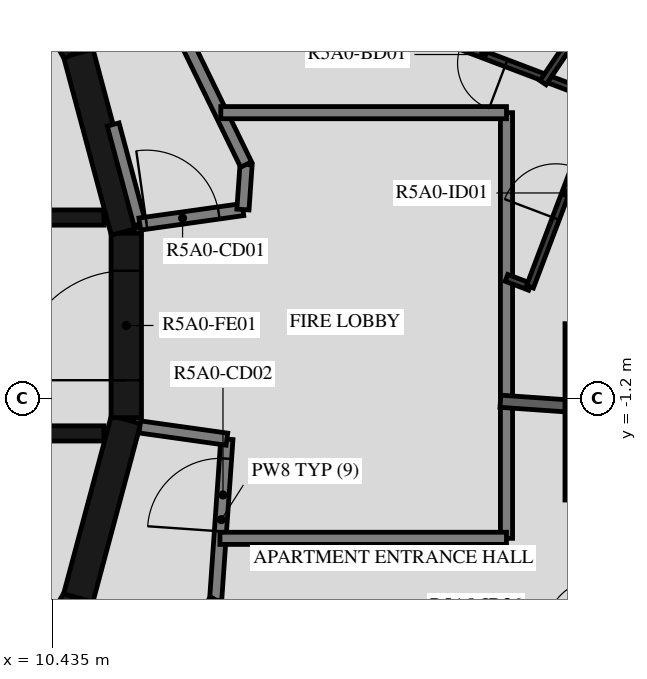
"""IFC4 building model, lengths in metres.
Left out: names, types, materials, properties, quantities, classifications, styles, units other than length and angle.
Written with IfcOpenShell. Run it as: python <this file> out.ifc"""

import sys

from ifc_helpers import new_model, si_unit, direction, frame, frame_2d, origin, place, context, subcontext, project, spatial, polyline, rectangle, outline, extrude, element, fill, save


model = new_model("IFC4")
c1 = context("Model", 3, precision=1e-05, world=origin(), true_north=direction((0.0, 1.0)))
c2 = subcontext(c1, "Body", "Model", "MODEL_VIEW")
j1 = project(units=[si_unit("LENGTHUNIT", "METRE"), si_unit("PLANEANGLEUNIT", "RADIAN")], contexts=[c1])
p1 = place(None, origin())
s1 = spatial("IfcSite", under=j1, at=p1, CompositionType="ELEMENT")
p2 = place(p1, origin())
s2 = spatial("IfcBuilding", under=s1, at=p2, CompositionType="ELEMENT")
p3 = place(p2, frame((0.0, 0.0, 188.4)))
s3 = spatial("IfcBuildingStorey", under=s2, at=p3, CompositionType="ELEMENT", Elevation=188.4)
p4 = place(p3, frame((-0.808, 27.101, 0.03), z_axis=(0.0, 0.0, 1.0), x_axis=(0.76040780846, -0.649445890613, 0.0)))
e1 = element("IfcWall", 1, at=p4, inside=s3, PredefinedType="PARAPET", context=c2, shape_type="SweptSolid", body=[
    extrude(rectangle(XDim=36.429, YDim=0.2, at=frame_2d((18.214, 0.0))), origin(), (0.0, 0.0, 1.0), 1.5),
])
for number, where, z_axis, x_axis in (
    (2, (9.329, -7.137, 0.0), (0.0, 0.0, 1.0), (0.5, 0.866, 0.0)),
    (3, (10.858, -4.479, 0.0), (0.0, 0.0, 1.0), (0.259, 0.966, 0.0)),
):
    element("IfcWall", number, at=place(p3, frame(where, z_axis=z_axis, x_axis=x_axis)), inside=s3, PredefinedType="SHEAR", context=c2, shape_type="SweptSolid", body=[
        extrude(rectangle(XDim=3.033, YDim=0.5, at=frame_2d((1.516, 0.0))), origin(), (0.0, 0.0, 1.0), 3.12),
    ])
p5 = place(p3, frame((11.647, -1.516, 0.0), z_axis=(0.0, 0.0, 1.0), x_axis=(0.0, 1.0, 0.0)))
e4 = element("IfcWall", 4, at=p5, inside=s3, PredefinedType="SHEAR", context=c2, shape_type="SweptSolid", body=[
    extrude(rectangle(XDim=3.033, YDim=0.5, at=frame_2d((1.516, 0.0))), origin(), (0.0, 0.0, 1.0), 3.12),
])
p6 = place(p5, frame((0.616, 0.0, 0.0)))
e5 = element("IfcOpeningElement", 5, at=p6, cuts=e4, PredefinedType="OPENING", context=c2, shape_type="SweptSolid", body=[
    extrude(rectangle(XDim=1.8, YDim=2.1, at=frame_2d((0.9, 1.05))), frame((0.0, 0.26, 0.0), z_axis=(0.0, -1.0, 0.0), x_axis=(1.0, 0.0, 0.0)), (0.0, 0.0, 1.0), 0.52),
])
for number, where, z_axis, x_axis in (
    (6, (11.643, 1.55, 0.0), (0.0, 0.0, 1.0), (-0.259, 0.966, 0.0)),
    (7, (10.845, 4.51, 0.0), (0.0, 0.0, 1.0), (-0.5, 0.866, 0.0)),
):
    element("IfcWall", number, at=place(p3, frame(where, z_axis=z_axis, x_axis=x_axis)), inside=s3, PredefinedType="SHEAR", context=c2, shape_type="SweptSolid", body=[
        extrude(rectangle(XDim=3.033, YDim=0.5, at=frame_2d((1.516, 0.0))), origin(), (0.0, 0.0, 1.0), 3.12),
    ])
p7 = place(p3, frame((3.35, 1.775, 0.0), z_axis=(0.0, 0.0, 1.0), x_axis=(1.0, 0.0, 0.0)))
e8 = element("IfcWall", 8, at=p7, inside=s3, PredefinedType="SHEAR", context=c2, shape_type="SweptSolid", body=[
    extrude(rectangle(XDim=7.93, YDim=0.25, at=frame_2d((3.965, 0.0))), origin(), (0.0, 0.0, 1.0), 3.12),
])
p8 = place(p7, frame((0.35, 0.0, 0.0)))
e9 = element("IfcOpeningElement", 9, at=p8, cuts=e8, PredefinedType="OPENING", context=c2, shape_type="SweptSolid", body=[
    extrude(rectangle(XDim=1.2, YDim=2.4, at=frame_2d((0.6, 1.2))), frame((0.0, 0.135, 0.0), z_axis=(0.0, -1.0, 0.0), x_axis=(1.0, 0.0, 0.0)), (0.0, 0.0, 1.0), 0.27),
])
p9 = place(p7, frame((2.5, 0.0, 0.0)))
e10 = element("IfcOpeningElement", 10, at=p9, cuts=e8, PredefinedType="OPENING", context=c2, shape_type="SweptSolid", body=[
    extrude(rectangle(XDim=1.2, YDim=2.4, at=frame_2d((0.6, 1.2))), frame((0.0, 0.135, 0.0), z_axis=(0.0, -1.0, 0.0), x_axis=(1.0, 0.0, 0.0)), (0.0, 0.0, 1.0), 0.27),
])
p10 = place(p7, frame((4.8, 0.0, 0.0)))
e11 = element("IfcOpeningElement", 11, at=p10, cuts=e8, PredefinedType="OPENING", context=c2, shape_type="SweptSolid", body=[
    extrude(rectangle(XDim=0.9, YDim=2.1, at=frame_2d((0.45, 1.05))), frame((0.0, 0.135, 0.0), z_axis=(0.0, -1.0, 0.0), x_axis=(1.0, 0.0, 0.0)), (0.0, 0.0, 1.0), 0.27),
])
p11 = place(p3, frame((3.35, -1.775, 0.0), z_axis=(0.0, 0.0, 1.0), x_axis=(1.0, 0.0, 0.0)))
e12 = element("IfcWall", 12, at=p11, inside=s3, PredefinedType="SHEAR", context=c2, shape_type="SweptSolid", body=[
    extrude(rectangle(XDim=7.93, YDim=0.25, at=frame_2d((3.965, 0.0))), origin(), (0.0, 0.0, 1.0), 3.12),
])
p12 = place(p11, frame((0.4, 0.0, 0.0)))
e13 = element("IfcOpeningElement", 13, at=p12, cuts=e12, PredefinedType="OPENING", context=c2, shape_type="SweptSolid", body=[
    extrude(rectangle(XDim=1.1, YDim=2.4, at=frame_2d((0.55, 1.2))), frame((0.0, 0.135, 0.0), z_axis=(0.0, -1.0, 0.0), x_axis=(1.0, 0.0, 0.0)), (0.0, 0.0, 1.0), 0.27),
])
p13 = place(p11, frame((2.55, 0.0, 0.0)))
e14 = element("IfcOpeningElement", 14, at=p13, cuts=e12, PredefinedType="OPENING", context=c2, shape_type="SweptSolid", body=[
    extrude(rectangle(XDim=1.1, YDim=2.4, at=frame_2d((0.55, 1.2))), frame((0.0, 0.135, 0.0), z_axis=(0.0, -1.0, 0.0), x_axis=(1.0, 0.0, 0.0)), (0.0, 0.0, 1.0), 0.27),
])
p14 = place(p11, frame((4.7, 0.0, 0.0)))
e15 = element("IfcOpeningElement", 15, at=p14, cuts=e12, PredefinedType="OPENING", context=c2, shape_type="SweptSolid", body=[
    extrude(rectangle(XDim=1.1, YDim=2.4, at=frame_2d((0.55, 1.2))), frame((0.0, 0.135, 0.0), z_axis=(0.0, -1.0, 0.0), x_axis=(1.0, 0.0, 0.0)), (0.0, 0.0, 1.0), 0.27),
])
p15 = place(p3, frame((11.87, 1.668, 0.0), z_axis=(0.0, 0.0, 1.0), x_axis=(-0.258836880648, 0.965921047093, 0.0)))
e16 = element("IfcWall", 16, at=p15, inside=s3, PredefinedType="STANDARD", context=c2, shape_type="SweptSolid", body=[
    extrude(rectangle(XDim=1.695, YDim=0.2, at=frame_2d((0.848, 0.0))), origin(), (0.0, 0.0, 1.0), 3.12),
])
p16 = place(p3, frame((11.87, 1.668, 0.0), z_axis=(0.0, 0.0, 1.0), x_axis=(0.990271931984, 0.139145609792, 0.0)))
e17 = element("IfcWall", 17, at=p16, inside=s3, PredefinedType="STANDARD", context=c2, shape_type="SweptSolid", body=[
    extrude(rectangle(XDim=1.712, YDim=0.2, at=frame_2d((0.856, 0.0))), origin(), (0.0, 0.0, 1.0), 3.12),
])
p17 = place(p16, frame((0.11, 0.0, 0.0)))
e18 = element("IfcOpeningElement", 18, at=p17, cuts=e17, PredefinedType="OPENING", context=c2, shape_type="SweptSolid", body=[
    extrude(rectangle(XDim=1.2, YDim=2.1, at=frame_2d((0.6, 1.05))), frame((0.0, 0.11, 0.0), z_axis=(0.0, -1.0, 0.0), x_axis=(1.0, 0.0, 0.0)), (0.0, 0.0, 1.0), 0.22),
])
p18 = place(p3, frame((13.566, 1.906, 0.0), z_axis=(0.0, 0.0, 1.0), x_axis=(0.07005495793, 0.997543133338, 0.0)))
e19 = element("IfcWall", 19, at=p18, inside=s3, PredefinedType="STANDARD", context=c2, shape_type="SweptSolid", body=[
    extrude(rectangle(XDim=0.742, YDim=0.2, at=frame_2d((0.371, 0.0))), origin(), (0.0, 0.0, 1.0), 3.12),
])
p19 = place(p3, frame((13.618, 2.647, 0.0), z_axis=(0.0, 0.0, 1.0), x_axis=(-0.438366026218, 0.898796543751, 0.0)))
e20 = element("IfcWall", 20, at=p19, inside=s3, PredefinedType="STANDARD", context=c2, shape_type="SweptSolid", body=[
    extrude(rectangle(XDim=7.181, YDim=0.2, at=frame_2d((3.591, 0.0))), origin(), (0.0, 0.0, 1.0), 3.12),
])
p20 = place(p3, frame((13.117, -4.517, 0.0), z_axis=(0.0, 0.0, 1.0), x_axis=(0.069736659613, 0.997565435601, 0.0)))
e21 = element("IfcWall", 21, at=p20, inside=s3, PredefinedType="STANDARD", context=c2, shape_type="SweptSolid", body=[
    extrude(rectangle(XDim=2.654, YDim=0.2, at=frame_2d((1.327, 0.0))), origin(), (0.0, 0.0, 1.0), 3.12),
])
p21 = place(p20, frame((1.134, 0.0, 0.0)))
e22 = element("IfcOpeningElement", 22, at=p21, cuts=e21, PredefinedType="OPENING", context=c2, shape_type="SweptSolid", body=[
    extrude(rectangle(XDim=1.2, YDim=2.1, at=frame_2d((0.6, 1.05))), frame((0.0, 0.11, 0.0), z_axis=(0.0, -1.0, 0.0), x_axis=(1.0, 0.0, 0.0)), (0.0, 0.0, 1.0), 0.22),
])
p22 = place(p3, frame((13.302, -1.869, 0.0), z_axis=(0.0, 0.0, 1.0), x_axis=(-0.990274397042, 0.13912806533, 0.0)))
e23 = element("IfcWall", 23, at=p22, inside=s3, PredefinedType="STANDARD", context=c2, shape_type="SweptSolid", body=[
    extrude(rectangle(XDim=1.446, YDim=0.2, at=frame_2d((0.723, 0.0))), origin(), (0.0, 0.0, 1.0), 3.12),
])
p23 = place(p3, frame((9.101, -10.47, 0.0), z_axis=(0.0, 0.0, 1.0), x_axis=(0.559195469534, 0.829035841718, 0.0)))
e24 = element("IfcWall", 24, at=p23, inside=s3, PredefinedType="STANDARD", context=c2, shape_type="SweptSolid", body=[
    extrude(rectangle(XDim=7.181, YDim=0.2, at=frame_2d((3.591, 0.0))), origin(), (0.0, 0.0, 1.0), 3.12),
])
p24 = place(p3, frame((17.9, -3.5, 0.0), z_axis=(0.0, 0.0, 1.0), x_axis=(0.0, 1.0, 0.0)))
e25 = element("IfcWall", 25, at=p24, inside=s3, PredefinedType="STANDARD", context=c2, shape_type="SweptSolid", body=[
    extrude(rectangle(XDim=7.0, YDim=0.2, at=frame_2d((3.5, 0.0))), origin(), (0.0, 0.0, 1.0), 3.12),
])
p25 = place(p3, frame((17.9, 3.5, 0.0), z_axis=(0.0, 0.0, 1.0), x_axis=(-1.0, 0.0, 0.0)))
e26 = element("IfcWall", 26, at=p25, inside=s3, PredefinedType="STANDARD", context=c2, shape_type="SweptSolid", body=[
    extrude(rectangle(XDim=4.698, YDim=0.2, at=frame_2d((2.349, 0.0))), origin(), (0.0, 0.0, 1.0), 3.12),
])
p26 = place(p3, frame((13.188, -3.5, 0.0), z_axis=(0.0, 0.0, 1.0), x_axis=(1.0, 0.0, 0.0)))
e27 = element("IfcWall", 27, at=p26, inside=s3, PredefinedType="STANDARD", context=c2, shape_type="SweptSolid", body=[
    extrude(rectangle(XDim=4.712, YDim=0.2, at=frame_2d((2.356, 0.0))), origin(), (0.0, 0.0, 1.0), 3.12),
])
p27 = place(p3, frame((17.8, -1.246, 0.0), z_axis=(0.0, 0.0, 1.0), x_axis=(0.997562681713, -0.069776042122, 0.0)))
e28 = element("IfcWall", 28, at=p27, inside=s3, PredefinedType="STANDARD", context=c2, shape_type="SweptSolid", body=[
    extrude(rectangle(XDim=1.144, YDim=0.2, at=frame_2d((0.572, 0.0))), origin(), (0.0, 0.0, 1.0), 3.12),
])
p28 = place(p3, frame((17.9, 0.783, 0.0), z_axis=(0.0, 0.0, 1.0), x_axis=(0.93513272442, -0.354297597677, 0.0)))
e29 = element("IfcWall", 29, at=p28, inside=s3, PredefinedType="PARTITIONING", context=c2, shape_type="SweptSolid", body=[
    extrude(rectangle(XDim=0.413, YDim=0.12, at=frame_2d((0.207, 0.0))), origin(), (0.0, 0.0, 1.0), 3.12),
])
p29 = place(p3, frame((18.286, 0.637, 0.0), z_axis=(0.0, 0.0, 1.0), x_axis=(0.354672075988, 0.934990758518, 0.0)))
e30 = element("IfcWall", 30, at=p29, inside=s3, PredefinedType="PARTITIONING", context=c2, shape_type="SweptSolid", body=[
    extrude(rectangle(XDim=3.3, YDim=0.12, at=frame_2d((1.65, 0.0))), origin(), (0.0, 0.0, 1.0), 3.12),
])
p30 = place(p29, frame((1.2, 0.0, 0.0)))
e31 = element("IfcOpeningElement", 31, at=p30, cuts=e30, PredefinedType="OPENING", context=c2, shape_type="SweptSolid", body=[
    extrude(rectangle(XDim=0.9, YDim=2.1, at=frame_2d((0.45, 1.05))), frame((0.0, 0.07, 0.0), z_axis=(0.0, -1.0, 0.0), x_axis=(1.0, 0.0, 0.0)), (0.0, 0.0, 1.0), 0.14),
])
p31 = place(p3, frame((19.456, 3.722, 0.0), z_axis=(0.0, 0.0, 1.0), x_axis=(-0.935017484321, 0.3546016131, 0.0)))
e32 = element("IfcWall", 32, at=p31, inside=s3, PredefinedType="PARTITIONING", context=c2, shape_type="SweptSolid", body=[
    extrude(rectangle(XDim=5.734, YDim=0.12, at=frame_2d((2.867, 0.0))), origin(), (0.0, 0.0, 1.0), 3.12),
])
p32 = place(p31, frame((1.669, 0.0, 0.0)))
e33 = element("IfcOpeningElement", 33, at=p32, cuts=e32, PredefinedType="OPENING", context=c2, shape_type="SweptSolid", body=[
    extrude(rectangle(XDim=0.8, YDim=2.1, at=frame_2d((0.4, 1.05))), frame((0.0, 0.07, 0.0), z_axis=(0.0, -1.0, 0.0), x_axis=(1.0, 0.0, 0.0)), (0.0, 0.0, 1.0), 0.14),
])
p33 = place(p3, frame((22.598, 2.345, 0.0), z_axis=(0.0, 0.0, 1.0), x_axis=(-0.829034113947, 0.559198031034, 0.0)))
e34 = element("IfcWall", 34, at=p33, inside=s3, PredefinedType="PARTITIONING", context=c2, shape_type="SweptSolid", body=[
    extrude(rectangle(XDim=12.879, YDim=0.12, at=frame_2d((6.439, 0.0))), origin(), (0.0, 0.0, 1.0), 3.12),
])
p34 = place(p33, frame((0.2, 0.0, 0.0)))
e35 = element("IfcOpeningElement", 35, at=p34, cuts=e34, PredefinedType="OPENING", context=c2, shape_type="SweptSolid", body=[
    extrude(rectangle(XDim=0.9, YDim=2.1, at=frame_2d((0.45, 1.05))), frame((0.0, 0.07, 0.0), z_axis=(0.0, -1.0, 0.0), x_axis=(1.0, 0.0, 0.0)), (0.0, 0.0, 1.0), 0.14),
])
p35 = place(p3, frame((19.067, 4.832, 0.0), z_axis=(0.0, 0.0, 1.0), x_axis=(-0.559257363459, -0.828994090098, 0.0)))
e36 = element("IfcWall", 36, at=p35, inside=s3, PredefinedType="PARTITIONING", context=c2, shape_type="SweptSolid", body=[
    extrude(rectangle(XDim=1.012, YDim=0.12, at=frame_2d((0.506, 0.0))), origin(), (0.0, 0.0, 1.0), 3.12),
])
p36 = place(p3, origin())
e37 = element("IfcWall", 37, at=p36, inside=s3, PredefinedType="STANDARD", context=c2, shape_type="SweptSolid", body=[
    extrude(outline(polyline([(21.762, 0.03), (21.762, -2.87), (18.862, -2.87), (18.862, 0.03), (21.762, 0.03)]), holes=[polyline([(19.062, -2.67), (21.562, -2.67), (21.562, -0.17), (19.062, -0.17), (19.062, -2.67)])]), origin(), (0.0, 0.0, 1.0), 3.12),
])
p37 = place(p6, origin())
e38 = element("IfcDoor", 38, at=p37, inside=s3, OperationType="DOUBLE_DOOR_SINGLE_SWING", PredefinedType="DOOR", context=c2, shape_type="SweptSolid", body=[
    extrude(rectangle(XDim=1.8, YDim=2.1, at=frame_2d((0.9, 1.05))), frame((0.0, 0.025, 0.0), z_axis=(0.0, -1.0, 0.0), x_axis=(1.0, 0.0, 0.0)), (0.0, 0.0, 1.0), 0.05),
])
fill(e5, e38)
p38 = place(p30, origin())
e39 = element("IfcDoor", 39, at=p38, inside=s3, OperationType="SINGLE_SWING_LEFT", PredefinedType="DOOR", context=c2, shape_type="SweptSolid", body=[
    extrude(rectangle(XDim=0.9, YDim=2.1, at=frame_2d((0.45, 1.05))), frame((0.0, 0.025, 0.0), z_axis=(0.0, -1.0, 0.0), x_axis=(1.0, 0.0, 0.0)), (0.0, 0.0, 1.0), 0.05),
])
fill(e31, e39)
p39 = place(p32, origin())
e40 = element("IfcDoor", 40, at=p39, inside=s3, OperationType="SINGLE_SWING_LEFT", PredefinedType="DOOR", context=c2, shape_type="SweptSolid", body=[
    extrude(rectangle(XDim=0.8, YDim=2.1, at=frame_2d((0.4, 1.05))), frame((0.0, 0.025, 0.0), z_axis=(0.0, -1.0, 0.0), x_axis=(1.0, 0.0, 0.0)), (0.0, 0.0, 1.0), 0.05),
])
fill(e33, e40)
p40 = place(p17, origin())
e41 = element("IfcDoor", 41, at=p40, inside=s3, OperationType="DOUBLE_DOOR_SINGLE_SWING", PredefinedType="DOOR", context=c2, shape_type="SweptSolid", body=[
    extrude(rectangle(XDim=1.2, YDim=2.1, at=frame_2d((0.6, 1.05))), frame((0.0, 0.025, 0.0), z_axis=(0.0, -1.0, 0.0), x_axis=(1.0, 0.0, 0.0)), (0.0, 0.0, 1.0), 0.05),
])
fill(e18, e41)
p41 = place(p21, origin())
e42 = element("IfcDoor", 42, at=p41, inside=s3, OperationType="DOUBLE_DOOR_SINGLE_SWING", PredefinedType="DOOR", context=c2, shape_type="SweptSolid", body=[
    extrude(rectangle(XDim=1.2, YDim=2.1, at=frame_2d((0.6, 1.05))), frame((0.0, 0.025, 0.0), z_axis=(0.0, -1.0, 0.0), x_axis=(1.0, 0.0, 0.0)), (0.0, 0.0, 1.0), 0.05),
])
fill(e22, e42)
save(model, sys.argv[1])
